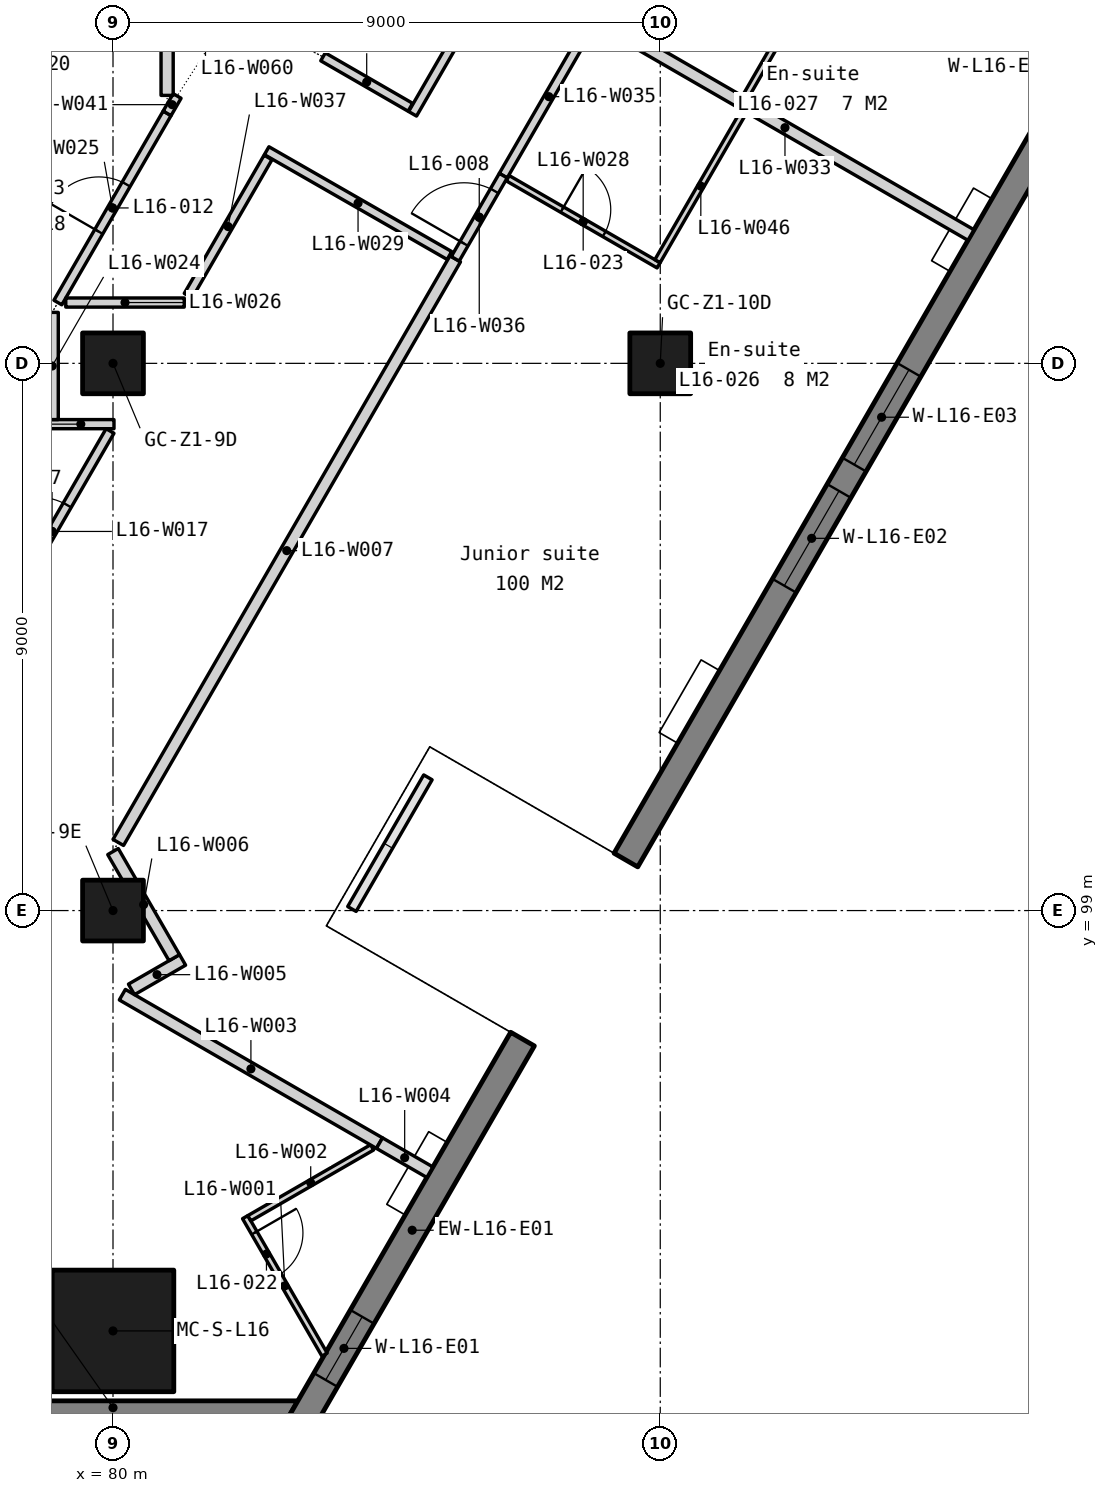
"""IFC4 building model, lengths in metres.
Left out: names, types, materials, properties, quantities, classifications, styles, units other than length and angle.
Written with IfcOpenShell. Run it as: python <this file> out.ifc"""

import sys

from ifc_helpers import new_model, si_unit, direction, frame, frame_2d, origin, origin_2d, place, context, subcontext, project, spatial, polyline, rectangle, outline, extrude, element, fill, save


model = new_model("IFC4")
c1 = context("Model", 3, precision=1e-05, world=origin(), true_north=direction((0.0, 1.0)))
c2 = subcontext(c1, "Body", "Model", "MODEL_VIEW")
j1 = project(units=[si_unit("LENGTHUNIT", "METRE"), si_unit("PLANEANGLEUNIT", "RADIAN")], contexts=[c1])
p1 = place(None, origin())
s1 = spatial("IfcSite", under=j1, at=p1, CompositionType="ELEMENT")
p2 = place(p1, origin())
s2 = spatial("IfcBuilding", under=s1, at=p2, CompositionType="ELEMENT")
p3 = place(p2, frame((0.0, 0.0, 70.0)))
s3 = spatial("IfcBuildingStorey", under=s2, at=p3, CompositionType="ELEMENT", Elevation=70.0)
for number, where, z_axis, x_axis in (
    (1, (80.0, 99.0, 0.0), (0.0, 0.0, 1.0), (1.0, 0.0, 0.0)),
    (2, (80.0, 108.0, 0.0), (0.0, 0.0, 1.0), (1.0, 0.0, 0.0)),
    (3, (89.0, 108.0, 0.0), (0.0, 0.0, 1.0), (1.0, 0.0, 0.0)),
):
    element("IfcColumn", number, at=place(p3, frame(where, z_axis=z_axis, x_axis=x_axis)), inside=s3, PredefinedType="COLUMN", context=c2, shape_type="SweptSolid", body=[
        extrude(rectangle(XDim=1.0, YDim=1.0, at=origin_2d()), origin(), (0.0, 0.0, 1.0), 3.5),
    ])
p4 = place(p3, frame((80.0, 92.086, 0.0), z_axis=(0.0, 0.0, 1.0), x_axis=(1.0, 0.0, 0.0)))
e4 = element("IfcColumn", 4, at=p4, inside=s3, PredefinedType="COLUMN", context=c2, shape_type="SweptSolid", body=[
    extrude(rectangle(XDim=2.0, YDim=2.0, at=origin_2d()), origin(), (0.0, 0.0, 1.0), 3.5),
])
p5 = place(p3, frame((0.0, 0.0, -0.15)))
e5 = element("IfcWall", 5, at=p5, inside=s3, PredefinedType="SOLIDWALL", context=c2, shape_type="SweptSolid", body=[
    extrude(outline(polyline([(76.7, 90.486), (77.09, 90.711), (76.96, 90.936), (83.04, 90.936), (82.91, 90.711), (83.3, 90.486), (76.7, 90.486)])), origin(), (0.0, 0.0, 1.0), 3.5),
])
p6 = place(p3, frame((83.105, 90.599, -0.15), z_axis=(0.0, 0.0, 1.0), x_axis=(0.4999873519, 0.866032706045, 0.0)))
e6 = element("IfcWall", 6, at=p6, inside=s3, PredefinedType="SOLIDWALL", context=c2, shape_type="SweptSolid", body=[
    extrude(outline(polyline([(0.0, 0.0), (0.0, 3.5), (7.26, 3.5), (7.26, 0.0), (0.0, 0.0)])), frame((0.0, 0.225, 0.0), z_axis=(0.0, -1.0, 0.0), x_axis=(1.0, 0.0, 0.0)), (0.0, 0.0, 1.0), 0.45),
])
p7 = place(p6, frame((0.786, 0.0, 1.05)))
e7 = element("IfcOpeningElement", 7, at=p7, cuts=e6, PredefinedType="OPENING", context=c2, shape_type="SweptSolid", body=[
    extrude(rectangle(XDim=1.2, YDim=1.5, at=frame_2d((0.6, 0.75))), frame((0.0, 0.235, 0.0), z_axis=(0.0, -1.0, 0.0), x_axis=(1.0, 0.0, 0.0)), (0.0, 0.0, 1.0), 0.47),
])
p8 = place(p3, frame((88.435, 99.831, -0.15), z_axis=(0.0, 0.0, 1.0), x_axis=(0.500000806382, 0.866024938219, 0.0)))
e8 = element("IfcWall", 8, at=p8, inside=s3, PredefinedType="SOLIDWALL", context=c2, shape_type="SweptSolid", body=[
    extrude(outline(polyline([(34.14, 3.5), (34.14, 0.0), (0.0, 0.0), (0.0, 3.5), (34.14, 3.5)])), frame((0.0, 0.225, 0.0), z_axis=(0.0, -1.0, 0.0), x_axis=(1.0, 0.0, 0.0)), (0.0, 0.0, 1.0), 0.45),
])
p9 = place(p8, frame((5.21, 0.0, 1.05)))
e9 = element("IfcOpeningElement", 9, at=p9, cuts=e8, PredefinedType="OPENING", context=c2, shape_type="SweptSolid", body=[
    extrude(rectangle(XDim=1.8, YDim=1.5, at=frame_2d((0.9, 0.75))), frame((0.0, 0.235, 0.0), z_axis=(0.0, -1.0, 0.0), x_axis=(1.0, 0.0, 0.0)), (0.0, 0.0, 1.0), 0.47),
])
p10 = place(p8, frame((7.51, 0.0, 1.05)))
e10 = element("IfcOpeningElement", 10, at=p10, cuts=e8, PredefinedType="OPENING", context=c2, shape_type="SweptSolid", body=[
    extrude(rectangle(XDim=1.8, YDim=1.5, at=frame_2d((0.9, 0.75))), frame((0.0, 0.235, 0.0), z_axis=(0.0, -1.0, 0.0), x_axis=(1.0, 0.0, 0.0)), (0.0, 0.0, 1.0), 0.47),
])
p11 = place(p8, frame((14.17, 0.0, 1.05)))
e11 = element("IfcOpeningElement", 11, at=p11, cuts=e8, PredefinedType="OPENING", context=c2, shape_type="SweptSolid", body=[
    extrude(rectangle(XDim=1.8, YDim=1.5, at=frame_2d((0.9, 0.75))), frame((0.0, 0.235, 0.0), z_axis=(0.0, -1.0, 0.0), x_axis=(1.0, 0.0, 0.0)), (0.0, 0.0, 1.0), 0.47),
])
p12 = place(p8, frame((16.47, 0.0, 1.05)))
e12 = element("IfcOpeningElement", 12, at=p12, cuts=e8, PredefinedType="OPENING", context=c2, shape_type="SweptSolid", body=[
    extrude(rectangle(XDim=1.8, YDim=1.5, at=frame_2d((0.9, 0.75))), frame((0.0, 0.235, 0.0), z_axis=(0.0, -1.0, 0.0), x_axis=(1.0, 0.0, 0.0)), (0.0, 0.0, 1.0), 0.47),
])
p13 = place(p8, frame((23.13, 0.0, 1.05)))
e13 = element("IfcOpeningElement", 13, at=p13, cuts=e8, PredefinedType="OPENING", context=c2, shape_type="SweptSolid", body=[
    extrude(rectangle(XDim=1.8, YDim=1.5, at=frame_2d((0.9, 0.75))), frame((0.0, 0.235, 0.0), z_axis=(0.0, -1.0, 0.0), x_axis=(1.0, 0.0, 0.0)), (0.0, 0.0, 1.0), 0.47),
])
p14 = place(p8, frame((25.43, 0.0, 1.05)))
e14 = element("IfcOpeningElement", 14, at=p14, cuts=e8, PredefinedType="OPENING", context=c2, shape_type="SweptSolid", body=[
    extrude(rectangle(XDim=1.8, YDim=1.5, at=frame_2d((0.9, 0.75))), frame((0.0, 0.235, 0.0), z_axis=(0.0, -1.0, 0.0), x_axis=(1.0, 0.0, 0.0)), (0.0, 0.0, 1.0), 0.47),
])
p15 = place(p8, frame((32.154, 0.0, 1.05)))
e15 = element("IfcOpeningElement", 15, at=p15, cuts=e8, PredefinedType="OPENING", context=c2, shape_type="SweptSolid", body=[
    extrude(rectangle(XDim=1.2, YDim=1.5, at=frame_2d((0.6, 0.75))), frame((0.0, 0.235, 0.0), z_axis=(0.0, -1.0, 0.0), x_axis=(1.0, 0.0, 0.0)), (0.0, 0.0, 1.0), 0.47),
])
p16 = place(p2, frame((0.0, 0.0, 66.5)))
s4 = spatial("IfcBuildingStorey", under=s2, at=p16, CompositionType="ELEMENT", Elevation=66.5)
for number, where, z_axis, x_axis in (
    (16, (87.042, 96.969, 0.0), (0.0, 0.0, 1.0), (-0.866, 0.5, 0.0)),
    (17, (88.518, 99.523, 0.0), (0.0, 0.0, 1.0), (-0.866, 0.5, 0.0)),
):
    element("IfcWall", number, at=place(p16, frame(where, z_axis=z_axis, x_axis=x_axis)), inside=s4, PredefinedType="SOLIDWALL", context=c2, shape_type="SweptSolid", body=[
        extrude(rectangle(XDim=3.95, YDim=0.45, at=frame_2d((1.975, 0.0))), origin(), (0.0, 0.0, 1.0), 6.85),
    ])
p17 = place(p3, frame((82.174, 93.958, 0.0), z_axis=(0.0, 0.0, 1.0), x_axis=(0.500040798873, -0.866001847263, 0.0)))
e18 = element("IfcWall", 18, at=p17, inside=s3, PredefinedType="PARTITIONING", context=c2, shape_type="SweptSolid", body=[
    extrude(rectangle(XDim=2.611, YDim=0.1, at=frame_2d((1.306, 0.0))), origin(), (0.0, 0.0, 1.0), 3.35),
])
p18 = place(p17, frame((0.3, 0.0, 0.0)))
e19 = element("IfcOpeningElement", 19, at=p18, cuts=e18, PredefinedType="OPENING", context=c2, shape_type="SweptSolid", body=[
    extrude(rectangle(XDim=0.8, YDim=2.1, at=frame_2d((0.4, 1.05))), frame((0.0, 0.06, 0.0), z_axis=(0.0, -1.0, 0.0), x_axis=(1.0, 0.0, 0.0)), (0.0, 0.0, 1.0), 0.12),
])
p19 = place(p3, frame((82.242, 93.939, 0.0), z_axis=(0.0, 0.0, 1.0), x_axis=(0.866011198387, 0.500024603663, 0.0)))
e20 = element("IfcWall", 20, at=p19, inside=s3, PredefinedType="PARTITIONING", context=c2, shape_type="SweptSolid", body=[
    extrude(rectangle(XDim=2.332, YDim=0.1, at=frame_2d((1.166, 0.0))), origin(), (0.0, 0.0, 1.0), 3.35),
])
p20 = place(p3, frame((80.154, 97.616, 0.0), z_axis=(0.0, 0.0, 1.0), x_axis=(0.866040703787, -0.499973498682, 0.0)))
e21 = element("IfcWall", 21, at=p20, inside=s3, PredefinedType="PARTITIONING", context=c2, shape_type="SweptSolid", body=[
    extrude(rectangle(XDim=4.883, YDim=0.2, at=frame_2d((2.441, 0.0))), origin(), (0.0, 0.0, 1.0), 3.35),
])
p21 = place(p3, frame((84.382, 95.175, 0.0), z_axis=(0.0, 0.0, 1.0), x_axis=(0.865926447167, -0.500171358732, 0.0)))
e22 = element("IfcWall", 22, at=p21, inside=s3, PredefinedType="PARTITIONING", context=c2, shape_type="SweptSolid", body=[
    extrude(rectangle(XDim=0.957, YDim=0.2, at=frame_2d((0.479, 0.0))), origin(), (0.0, 0.0, 1.0), 3.35),
])
p22 = place(p3, frame((80.304, 97.703, 0.0), z_axis=(0.0, 0.0, 1.0), x_axis=(0.866005469285, 0.500034525977, 0.0)))
e23 = element("IfcWall", 23, at=p22, inside=s3, PredefinedType="PARTITIONING", context=c2, shape_type="SweptSolid", body=[
    extrude(rectangle(XDim=0.971, YDim=0.2, at=frame_2d((0.485, 0.0))), origin(), (0.0, 0.0, 1.0), 3.35),
])
p23 = place(p3, frame((80.0, 99.97, 0.0), z_axis=(0.0, 0.0, 1.0), x_axis=(0.5000475079, -0.865997973348, 0.0)))
e24 = element("IfcWall", 24, at=p23, inside=s3, PredefinedType="PARTITIONING", context=c2, shape_type="SweptSolid", body=[
    extrude(rectangle(XDim=2.015, YDim=0.2, at=frame_2d((1.008, 0.0))), origin(), (0.0, 0.0, 1.0), 3.35),
])
p24 = place(p3, frame((80.087, 100.121, 0.0), z_axis=(0.0, 0.0, 1.0), x_axis=(0.500000851129, 0.866024912384, 0.0)))
e25 = element("IfcWall", 25, at=p24, inside=s3, PredefinedType="PARTITIONING", context=c2, shape_type="SweptSolid", body=[
    extrude(rectangle(XDim=11.083, YDim=0.2, at=frame_2d((5.542, 0.0))), origin(), (0.0, 0.0, 1.0), 3.35),
])
p25 = place(p3, frame((78.925, 107.0, 0.0), z_axis=(0.0, 0.0, 1.0), x_axis=(1.0, 0.0, 0.0)))
e26 = element("IfcWall", 26, at=p25, inside=s3, PredefinedType="PARTITIONING", context=c2, shape_type="SweptSolid", body=[
    extrude(rectangle(XDim=1.091, YDim=0.15, at=frame_2d((0.545, 0.0))), origin(), (0.0, 0.0, 1.0), 3.35),
])
p26 = place(p3, frame((78.044, 103.583, 0.0), z_axis=(0.0, 0.0, 1.0), x_axis=(0.499835090783, 0.866120593233, 0.0)))
e27 = element("IfcWall", 27, at=p26, inside=s3, PredefinedType="PARTITIONING", context=c2, shape_type="SweptSolid", body=[
    extrude(rectangle(XDim=3.815, YDim=0.15, at=frame_2d((1.908, 0.0))), origin(), (0.0, 0.0, 1.0), 3.35),
])
p27 = place(p26, frame((1.408, 0.0, 0.0)))
e28 = element("IfcOpeningElement", 28, at=p27, cuts=e27, PredefinedType="OPENING", context=c2, shape_type="SweptSolid", body=[
    extrude(rectangle(XDim=1.0, YDim=2.1, at=frame_2d((0.5, 1.05))), frame((0.0, 0.085, 0.0), z_axis=(0.0, -1.0, 0.0), x_axis=(1.0, 0.0, 0.0)), (0.0, 0.0, 1.0), 0.17),
])
p28 = place(p3, frame((79.0, 107.075, 0.0), z_axis=(0.0, 0.0, 1.0), x_axis=(0.0, 1.0, 0.0)))
e29 = element("IfcWall", 29, at=p28, inside=s3, PredefinedType="PARTITIONING", context=c2, shape_type="SweptSolid", body=[
    extrude(rectangle(XDim=1.763, YDim=0.2, at=frame_2d((0.882, 0.0))), origin(), (0.0, 0.0, 1.0), 3.35),
])
p29 = place(p3, frame((79.093, 109.0, 0.0), z_axis=(0.0, 0.0, 1.0), x_axis=(0.499975343382, 0.866039638822, 0.0)))
e30 = element("IfcWall", 30, at=p29, inside=s3, PredefinedType="PARTITIONING", context=c2, shape_type="SweptSolid", body=[
    extrude(rectangle(XDim=3.594, YDim=0.15, at=frame_2d((1.797, 0.0))), origin(), (0.0, 0.0, 1.0), 3.35),
])
p30 = place(p29, frame((1.347, 0.0, 0.0)))
e31 = element("IfcOpeningElement", 31, at=p30, cuts=e30, PredefinedType="OPENING", context=c2, shape_type="SweptSolid", body=[
    extrude(rectangle(XDim=0.9, YDim=2.1, at=frame_2d((0.45, 1.05))), frame((0.0, 0.085, 0.0), z_axis=(0.0, -1.0, 0.0), x_axis=(1.0, 0.0, 0.0)), (0.0, 0.0, 1.0), 0.17),
])
p31 = place(p3, frame((79.223, 109.0, 0.0), z_axis=(0.0, 0.0, 1.0), x_axis=(1.0, 0.0, 0.0)))
e32 = element("IfcWall", 32, at=p31, inside=s3, PredefinedType="PARTITIONING", context=c2, shape_type="SweptSolid", body=[
    extrude(rectangle(XDim=1.948, YDim=0.15, at=frame_2d((0.974, 0.0))), origin(), (0.0, 0.0, 1.0), 3.35),
])
p32 = place(p3, frame((86.492, 111.045, 0.0), z_axis=(0.0, 0.0, 1.0), x_axis=(0.866047940603, -0.499960963054, 0.0)))
e33 = element("IfcWall", 33, at=p32, inside=s3, PredefinedType="PARTITIONING", context=c2, shape_type="SweptSolid", body=[
    extrude(rectangle(XDim=2.865, YDim=0.1, at=frame_2d((1.433, 0.0))), origin(), (0.0, 0.0, 1.0), 3.35),
])
p33 = place(p32, frame((1.032, 0.0, 0.0)))
e34 = element("IfcOpeningElement", 34, at=p33, cuts=e33, PredefinedType="OPENING", context=c2, shape_type="SweptSolid", body=[
    extrude(rectangle(XDim=0.8, YDim=2.1, at=frame_2d((0.4, 1.05))), frame((0.0, 0.06, 0.0), z_axis=(0.0, -1.0, 0.0), x_axis=(1.0, 0.0, 0.0)), (0.0, 0.0, 1.0), 0.12),
])
p34 = place(p3, frame((82.527, 111.498, 0.0), z_axis=(0.0, 0.0, 1.0), x_axis=(0.867448529518, -0.497526932575, 0.0)))
e35 = element("IfcWall", 35, at=p34, inside=s3, PredefinedType="PARTITIONING", context=c2, shape_type="SweptSolid", body=[
    extrude(rectangle(XDim=3.465, YDim=0.15, at=frame_2d((1.732, 0.0))), origin(), (0.0, 0.0, 1.0), 3.35),
])
p35 = place(p3, frame((87.992, 113.643, 0.0), z_axis=(0.0, 0.0, 1.0), x_axis=(0.866033669941, -0.499985682323, 0.0)))
e36 = element("IfcWall", 36, at=p35, inside=s3, PredefinedType="PARTITIONING", context=c2, shape_type="SweptSolid", body=[
    extrude(rectangle(XDim=7.065, YDim=0.2, at=frame_2d((3.533, 0.0))), origin(), (0.0, 0.0, 1.0), 3.35),
])
p36 = place(p3, frame((86.418, 111.087, 0.0), z_axis=(0.0, 0.0, 1.0), x_axis=(0.499990139034, 0.866031096941, 0.0)))
e37 = element("IfcWall", 37, at=p36, inside=s3, PredefinedType="PARTITIONING", context=c2, shape_type="SweptSolid", body=[
    extrude(rectangle(XDim=3.0, YDim=0.15, at=frame_2d((1.5, 0.0))), origin(), (0.0, 0.0, 1.0), 3.35),
])
p37 = place(p3, frame((85.628, 109.719, 0.0), z_axis=(0.0, 0.0, 1.0), x_axis=(0.499994407638, 0.866028632512, 0.0)))
e38 = element("IfcWall", 38, at=p37, inside=s3, PredefinedType="PARTITIONING", context=c2, shape_type="SweptSolid", body=[
    extrude(rectangle(XDim=1.58, YDim=0.15, at=frame_2d((0.79, 0.0))), origin(), (0.0, 0.0, 1.0), 3.35),
])
p38 = place(p37, frame((0.29, 0.0, 0.0)))
e39 = element("IfcOpeningElement", 39, at=p38, cuts=e38, PredefinedType="OPENING", context=c2, shape_type="SweptSolid", body=[
    extrude(rectangle(XDim=1.0, YDim=2.1, at=frame_2d((0.5, 1.05))), frame((0.0, 0.085, 0.0), z_axis=(0.0, -1.0, 0.0), x_axis=(1.0, 0.0, 0.0)), (0.0, 0.0, 1.0), 0.17),
])
p39 = place(p3, frame((81.237, 109.113, 0.0), z_axis=(0.0, 0.0, 1.0), x_axis=(0.500039022115, 0.866002873184, 0.0)))
e40 = element("IfcWall", 40, at=p39, inside=s3, PredefinedType="PARTITIONING", context=c2, shape_type="SweptSolid", body=[
    extrude(rectangle(XDim=2.626, YDim=0.15, at=frame_2d((1.313, 0.0))), origin(), (0.0, 0.0, 1.0), 3.35),
])
p40 = place(p3, frame((80.89, 112.112, 0.0), z_axis=(0.0, 0.0, 1.0), x_axis=(0.500598341109, 0.865679675676, 0.0)))
e41 = element("IfcWall", 41, at=p40, inside=s3, PredefinedType="PARTITIONING", context=c2, shape_type="SweptSolid", body=[
    extrude(rectangle(XDim=0.33, YDim=0.15, at=frame_2d((0.165, 0.0))), origin(), (0.0, 0.0, 1.0), 3.35),
])
p41 = place(p3, frame((80.89, 112.407, 0.0), z_axis=(0.0, 0.0, 1.0), x_axis=(0.0, 1.0, 0.0)))
e42 = element("IfcWall", 42, at=p41, inside=s3, PredefinedType="PARTITIONING", context=c2, shape_type="SweptSolid", body=[
    extrude(rectangle(XDim=5.268, YDim=0.2, at=frame_2d((2.634, 0.0))), origin(), (0.0, 0.0, 1.0), 3.35),
])
p42 = place(p3, frame((84.927, 112.104, 0.0), z_axis=(0.0, 0.0, 1.0), x_axis=(0.50000555188, 0.866022198381, 0.0)))
e43 = element("IfcWall", 43, at=p42, inside=s3, PredefinedType="PARTITIONING", context=c2, shape_type="SweptSolid", body=[
    extrude(rectangle(XDim=6.52, YDim=0.15, at=frame_2d((3.26, 0.0))), origin(), (0.0, 0.0, 1.0), 3.35),
])
p43 = place(p3, frame((88.955, 109.68, 0.0), z_axis=(0.0, 0.0, 1.0), x_axis=(0.499999279071, 0.866025820012, 0.0)))
e44 = element("IfcWall", 44, at=p43, inside=s3, PredefinedType="PARTITIONING", context=c2, shape_type="SweptSolid", body=[
    extrude(rectangle(XDim=2.85, YDim=0.1, at=frame_2d((1.425, 0.0))), origin(), (0.0, 0.0, 1.0), 3.35),
])
p44 = place(p3, frame((83.454, 113.041, 0.0), z_axis=(0.0, 0.0, 1.0), x_axis=(0.866006690807, -0.500032410427, 0.0)))
e45 = element("IfcWall", 45, at=p44, inside=s3, PredefinedType="PARTITIONING", context=c2, shape_type="SweptSolid", body=[
    extrude(rectangle(XDim=1.659, YDim=0.15, at=frame_2d((0.83, 0.0))), origin(), (0.0, 0.0, 1.0), 3.35),
])
p45 = place(p3, frame((90.398, 112.381, 0.0), z_axis=(0.0, 0.0, 1.0), x_axis=(0.499978641112, 0.866037734993, 0.0)))
e46 = element("IfcWall", 46, at=p45, inside=s3, PredefinedType="PARTITIONING", context=c2, shape_type="SweptSolid", body=[
    extrude(rectangle(XDim=2.64, YDim=0.1, at=frame_2d((1.32, 0.0))), origin(), (0.0, 0.0, 1.0), 3.35),
])
p46 = place(p7, origin())
e47 = element("IfcWindow", 47, at=p46, inside=s3, PartitioningType="SINGLE_PANEL", PredefinedType="WINDOW", context=c2, shape_type="SweptSolid", body=[
    extrude(rectangle(XDim=1.2, YDim=1.5, at=frame_2d((0.6, 0.75))), frame((0.0, 0.03, 0.0), z_axis=(0.0, -1.0, 0.0), x_axis=(1.0, 0.0, 0.0)), (0.0, 0.0, 1.0), 0.06),
])
fill(e7, e47)
p47 = place(p9, origin())
e48 = element("IfcWindow", 48, at=p47, inside=s3, PartitioningType="SINGLE_PANEL", PredefinedType="WINDOW", context=c2, shape_type="SweptSolid", body=[
    extrude(rectangle(XDim=1.8, YDim=1.5, at=frame_2d((0.9, 0.75))), frame((0.0, 0.03, 0.0), z_axis=(0.0, -1.0, 0.0), x_axis=(1.0, 0.0, 0.0)), (0.0, 0.0, 1.0), 0.06),
])
fill(e9, e48)
p48 = place(p10, origin())
e49 = element("IfcWindow", 49, at=p48, inside=s3, PartitioningType="SINGLE_PANEL", PredefinedType="WINDOW", context=c2, shape_type="SweptSolid", body=[
    extrude(rectangle(XDim=1.8, YDim=1.5, at=frame_2d((0.9, 0.75))), frame((0.0, 0.03, 0.0), z_axis=(0.0, -1.0, 0.0), x_axis=(1.0, 0.0, 0.0)), (0.0, 0.0, 1.0), 0.06),
])
fill(e10, e49)
p49 = place(p27, origin())
e50 = element("IfcDoor", 50, at=p49, inside=s3, OperationType="SINGLE_SWING_LEFT", PredefinedType="DOOR", context=c2, shape_type="SweptSolid", body=[
    extrude(rectangle(XDim=1.0, YDim=2.1, at=frame_2d((0.5, 1.05))), frame((0.0, 0.025, 0.0), z_axis=(0.0, -1.0, 0.0), x_axis=(1.0, 0.0, 0.0)), (0.0, 0.0, 1.0), 0.05),
])
fill(e28, e50)
p50 = place(p38, origin())
e51 = element("IfcDoor", 51, at=p50, inside=s3, OperationType="SINGLE_SWING_LEFT", PredefinedType="DOOR", context=c2, shape_type="SweptSolid", body=[
    extrude(rectangle(XDim=1.0, YDim=2.1, at=frame_2d((0.5, 1.05))), frame((0.0, 0.025, 0.0), z_axis=(0.0, -1.0, 0.0), x_axis=(1.0, 0.0, 0.0)), (0.0, 0.0, 1.0), 0.05),
])
fill(e39, e51)
p51 = place(p30, origin())
e52 = element("IfcDoor", 52, at=p51, inside=s3, OperationType="SINGLE_SWING_LEFT", PredefinedType="DOOR", context=c2, shape_type="SweptSolid", body=[
    extrude(rectangle(XDim=0.9, YDim=2.1, at=frame_2d((0.45, 1.05))), frame((0.0, 0.025, 0.0), z_axis=(0.0, -1.0, 0.0), x_axis=(1.0, 0.0, 0.0)), (0.0, 0.0, 1.0), 0.05),
])
fill(e31, e52)
p52 = place(p18, origin())
e53 = element("IfcDoor", 53, at=p52, inside=s3, OperationType="SINGLE_SWING_LEFT", PredefinedType="DOOR", context=c2, shape_type="SweptSolid", body=[
    extrude(rectangle(XDim=0.8, YDim=2.1, at=frame_2d((0.4, 1.05))), frame((0.0, 0.025, 0.0), z_axis=(0.0, -1.0, 0.0), x_axis=(1.0, 0.0, 0.0)), (0.0, 0.0, 1.0), 0.05),
])
fill(e19, e53)
p53 = place(p33, origin())
e54 = element("IfcDoor", 54, at=p53, inside=s3, OperationType="SINGLE_SWING_LEFT", PredefinedType="DOOR", context=c2, shape_type="SweptSolid", body=[
    extrude(rectangle(XDim=0.8, YDim=2.1, at=frame_2d((0.4, 1.05))), frame((0.0, 0.025, 0.0), z_axis=(0.0, -1.0, 0.0), x_axis=(1.0, 0.0, 0.0)), (0.0, 0.0, 1.0), 0.05),
])
fill(e34, e54)
save(model, sys.argv[1])
